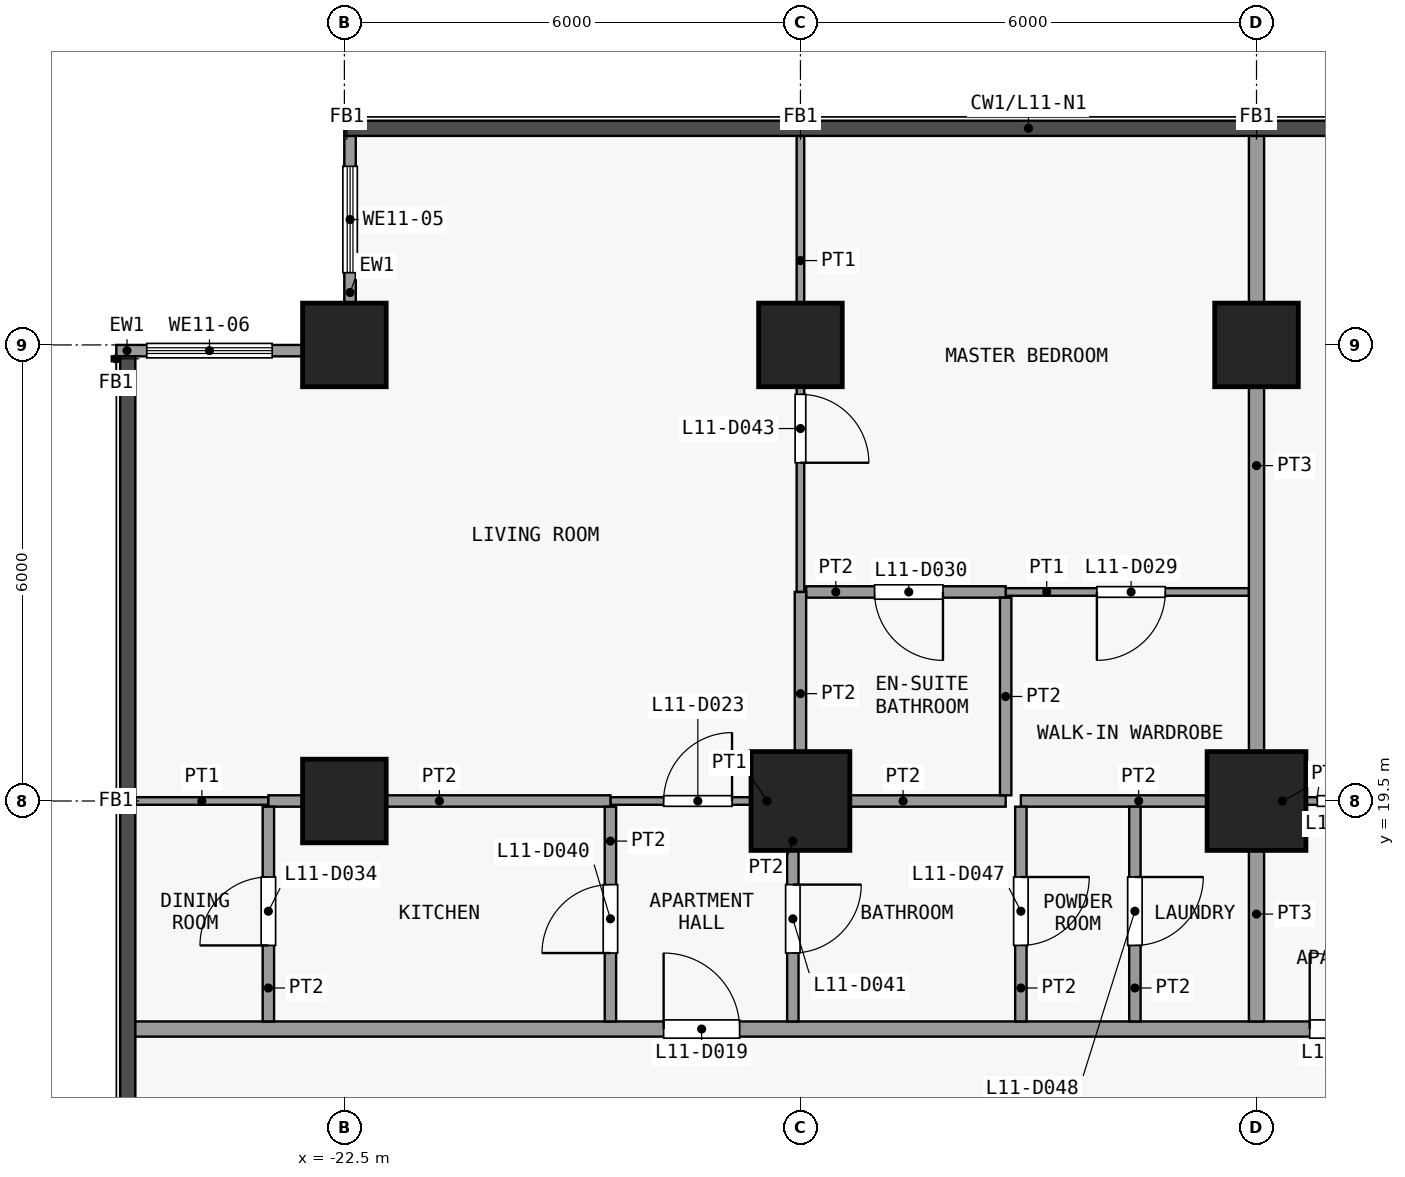
"""IFC4 building model, lengths in metres.
Left out: names, types, materials, properties, quantities, classifications, styles, units other than length and angle.
Written with IfcOpenShell. Run it as: python <this file> out.ifc"""

import sys

from ifc_helpers import new_model, si_unit, direction, frame, frame_2d, origin, origin_2d, place, context, subcontext, project, spatial, rectangle, extrude, element, fill, save


model = new_model("IFC4")
c1 = context("Model", 3, precision=1e-05, world=origin(), true_north=direction((0.0, 1.0)))
c2 = subcontext(c1, "Body", "Model", "MODEL_VIEW")
j1 = project(units=[si_unit("LENGTHUNIT", "METRE"), si_unit("PLANEANGLEUNIT", "RADIAN")], contexts=[c1])
p1 = place(None, origin())
s1 = spatial("IfcSite", under=j1, at=p1, CompositionType="ELEMENT")
p2 = place(p1, origin())
s2 = spatial("IfcBuilding", under=s1, at=p2, CompositionType="ELEMENT")
p3 = place(p2, frame((0.0, 0.0, 50.5)))
s3 = spatial("IfcBuildingStorey", under=s2, at=p3, CompositionType="ELEMENT", Elevation=50.5)
for number, where, z_axis, x_axis in (
    (1, (-22.5, 19.5, 0.0), (0.0, 0.0, 1.0), (1.0, 0.0, 0.0)),
    (2, (-22.5, 25.5, 0.0), (0.0, 0.0, 1.0), (1.0, 0.0, 0.0)),
):
    element("IfcColumn", number, at=place(p3, frame(where, z_axis=z_axis, x_axis=x_axis)), inside=s3, PredefinedType="COLUMN", context=c2, shape_type="SweptSolid", body=[
        extrude(rectangle(XDim=1.1, YDim=1.1, at=origin_2d()), origin(), (0.0, 0.0, 1.0), 3.6),
    ])
p4 = place(p3, frame((-16.5, 19.5, 0.0), z_axis=(0.0, 0.0, 1.0), x_axis=(1.0, 0.0, 0.0)))
e3 = element("IfcColumn", 3, at=p4, inside=s3, PredefinedType="COLUMN", context=c2, shape_type="SweptSolid", body=[
    extrude(rectangle(XDim=1.3, YDim=1.3, at=origin_2d()), origin(), (0.0, 0.0, 1.0), 3.6),
])
p5 = place(p3, frame((-16.5, 25.5, 0.0), z_axis=(0.0, 0.0, 1.0), x_axis=(1.0, 0.0, 0.0)))
e4 = element("IfcColumn", 4, at=p5, inside=s3, PredefinedType="COLUMN", context=c2, shape_type="SweptSolid", body=[
    extrude(rectangle(XDim=1.1, YDim=1.1, at=origin_2d()), origin(), (0.0, 0.0, 1.0), 3.6),
])
p6 = place(p3, frame((-10.5, 19.5, 0.0), z_axis=(0.0, 0.0, 1.0), x_axis=(1.0, 0.0, 0.0)))
e5 = element("IfcColumn", 5, at=p6, inside=s3, PredefinedType="COLUMN", context=c2, shape_type="SweptSolid", body=[
    extrude(rectangle(XDim=1.3, YDim=1.3, at=origin_2d()), origin(), (0.0, 0.0, 1.0), 3.6),
])
p7 = place(p3, frame((-10.5, 25.5, 0.0), z_axis=(0.0, 0.0, 1.0), x_axis=(1.0, 0.0, 0.0)))
e6 = element("IfcColumn", 6, at=p7, inside=s3, PredefinedType="COLUMN", context=c2, shape_type="SweptSolid", body=[
    extrude(rectangle(XDim=1.1, YDim=1.1, at=origin_2d()), origin(), (0.0, 0.0, 1.0), 3.6),
])
p8 = place(p3, frame((-22.425, 26.05, 0.0), z_axis=(0.0, 0.0, 1.0), x_axis=(0.0, 1.0, 0.0)))
e7 = element("IfcWall", 7, at=p8, inside=s3, PredefinedType="SOLIDWALL", context=c2, shape_type="SweptSolid", body=[
    extrude(rectangle(XDim=2.2, YDim=0.15, at=frame_2d((1.1, 0.0))), origin(), (0.0, 0.0, 1.0), 3.3),
])
p9 = place(p8, frame((0.4, 0.0, 0.9)))
e8 = element("IfcOpeningElement", 8, at=p9, cuts=e7, PredefinedType="OPENING", context=c2, shape_type="SweptSolid", body=[
    extrude(rectangle(XDim=1.4, YDim=2.4, at=frame_2d((0.7, 1.2))), frame((0.0, 0.085, 0.0), z_axis=(0.0, -1.0, 0.0), x_axis=(1.0, 0.0, 0.0)), (0.0, 0.0, 1.0), 0.17),
])
p10 = place(p3, frame((-25.5, 25.425, 0.0), z_axis=(0.0, 0.0, 1.0), x_axis=(1.0, 0.0, 0.0)))
e9 = element("IfcWall", 9, at=p10, inside=s3, PredefinedType="SOLIDWALL", context=c2, shape_type="SweptSolid", body=[
    extrude(rectangle(XDim=2.45, YDim=0.15, at=frame_2d((1.225, 0.0))), origin(), (0.0, 0.0, 1.0), 3.3),
])
p11 = place(p10, frame((0.4, 0.0, 0.9)))
e10 = element("IfcOpeningElement", 10, at=p11, cuts=e9, PredefinedType="OPENING", context=c2, shape_type="SweptSolid", body=[
    extrude(rectangle(XDim=1.65, YDim=2.4, at=frame_2d((0.825, 1.2))), frame((0.0, 0.085, 0.0), z_axis=(0.0, -1.0, 0.0), x_axis=(1.0, 0.0, 0.0)), (0.0, 0.0, 1.0), 0.17),
])
p12 = place(p3, frame((-25.35, 16.5, 0.0), z_axis=(0.0, 0.0, 1.0), x_axis=(1.0, 0.0, 0.0)))
e11 = element("IfcWall", 11, at=p12, inside=s3, PredefinedType="PARTITIONING", context=c2, shape_type="SweptSolid", body=[
    extrude(rectangle(XDim=50.7, YDim=0.2, at=frame_2d((25.35, 0.0))), origin(), (0.0, 0.0, 1.0), 3.3),
])
p13 = place(p12, frame((7.05, 0.0, 0.0)))
e12 = element("IfcOpeningElement", 12, at=p13, cuts=e11, PredefinedType="OPENING", context=c2, shape_type="SweptSolid", body=[
    extrude(rectangle(XDim=1.0, YDim=2.1, at=frame_2d((0.5, 1.05))), frame((0.0, 0.11, 0.0), z_axis=(0.0, -1.0, 0.0), x_axis=(1.0, 0.0, 0.0)), (0.0, 0.0, 1.0), 0.22),
])
p14 = place(p12, frame((15.55, 0.0, 0.0)))
e13 = element("IfcOpeningElement", 13, at=p14, cuts=e11, PredefinedType="OPENING", context=c2, shape_type="SweptSolid", body=[
    extrude(rectangle(XDim=1.0, YDim=2.1, at=frame_2d((0.5, 1.05))), frame((0.0, 0.11, 0.0), z_axis=(0.0, -1.0, 0.0), x_axis=(1.0, 0.0, 0.0)), (0.0, 0.0, 1.0), 0.22),
])
p15 = place(p12, frame((30.55, 0.0, 0.0)))
e14 = element("IfcOpeningElement", 14, at=p15, cuts=e11, PredefinedType="OPENING", context=c2, shape_type="SweptSolid", body=[
    extrude(rectangle(XDim=1.0, YDim=2.1, at=frame_2d((0.5, 1.05))), frame((0.0, 0.11, 0.0), z_axis=(0.0, -1.0, 0.0), x_axis=(1.0, 0.0, 0.0)), (0.0, 0.0, 1.0), 0.22),
])
p16 = place(p12, frame((45.05, 0.0, 0.0)))
e15 = element("IfcOpeningElement", 15, at=p16, cuts=e11, PredefinedType="OPENING", context=c2, shape_type="SweptSolid", body=[
    extrude(rectangle(XDim=1.0, YDim=2.1, at=frame_2d((0.5, 1.05))), frame((0.0, 0.11, 0.0), z_axis=(0.0, -1.0, 0.0), x_axis=(1.0, 0.0, 0.0)), (0.0, 0.0, 1.0), 0.22),
])
p17 = place(p3, frame((-25.25, 19.5, 0.0), z_axis=(0.0, 0.0, 1.0), x_axis=(1.0, 0.0, 0.0)))
e16 = element("IfcWall", 16, at=p17, inside=s3, PredefinedType="PARTITIONING", context=c2, shape_type="SweptSolid", body=[
    extrude(rectangle(XDim=1.75, YDim=0.1, at=frame_2d((0.875, 0.0))), origin(), (0.0, 0.0, 1.0), 3.3),
])
p18 = place(p3, frame((-19.0, 19.5, 0.0), z_axis=(0.0, 0.0, 1.0), x_axis=(1.0, 0.0, 0.0)))
e17 = element("IfcWall", 17, at=p18, inside=s3, PredefinedType="PARTITIONING", context=c2, shape_type="SweptSolid", body=[
    extrude(rectangle(XDim=2.4, YDim=0.1, at=frame_2d((1.2, 0.0))), origin(), (0.0, 0.0, 1.0), 3.3),
])
p19 = place(p18, frame((0.7, 0.0, 0.0)))
e18 = element("IfcOpeningElement", 18, at=p19, cuts=e17, PredefinedType="OPENING", context=c2, shape_type="SweptSolid", body=[
    extrude(rectangle(XDim=0.9, YDim=2.1, at=frame_2d((0.45, 1.05))), frame((0.0, 0.06, 0.0), z_axis=(0.0, -1.0, 0.0), x_axis=(1.0, 0.0, 0.0)), (0.0, 0.0, 1.0), 0.12),
])
p20 = place(p3, frame((-10.5, 19.5, 0.0), z_axis=(0.0, 0.0, 1.0), x_axis=(1.0, 0.0, 0.0)))
e19 = element("IfcWall", 19, at=p20, inside=s3, PredefinedType="PARTITIONING", context=c2, shape_type="SweptSolid", body=[
    extrude(rectangle(XDim=2.4, YDim=0.1, at=frame_2d((1.2, 0.0))), origin(), (0.0, 0.0, 1.0), 3.3),
])
p21 = place(p20, frame((0.8, 0.0, 0.0)))
e20 = element("IfcOpeningElement", 20, at=p21, cuts=e19, PredefinedType="OPENING", context=c2, shape_type="SweptSolid", body=[
    extrude(rectangle(XDim=0.9, YDim=2.1, at=frame_2d((0.45, 1.05))), frame((0.0, 0.06, 0.0), z_axis=(0.0, -1.0, 0.0), x_axis=(1.0, 0.0, 0.0)), (0.0, 0.0, 1.0), 0.12),
])
p22 = place(p3, frame((-23.5, 19.5, 0.0), z_axis=(0.0, 0.0, 1.0), x_axis=(1.0, 0.0, 0.0)))
e21 = element("IfcWall", 21, at=p22, inside=s3, PredefinedType="PARTITIONING", context=c2, shape_type="SweptSolid", body=[
    extrude(rectangle(XDim=4.5, YDim=0.15, at=frame_2d((2.25, 0.0))), origin(), (0.0, 0.0, 1.0), 3.3),
])
p23 = place(p3, frame((-16.5, 19.5, 0.0), z_axis=(0.0, 0.0, 1.0), x_axis=(1.0, 0.0, 0.0)))
e22 = element("IfcWall", 22, at=p23, inside=s3, PredefinedType="PARTITIONING", context=c2, shape_type="SweptSolid", body=[
    extrude(rectangle(XDim=2.7, YDim=0.15, at=frame_2d((1.35, 0.0))), origin(), (0.0, 0.0, 1.0), 3.3),
])
p24 = place(p3, frame((-13.6, 19.5, 0.0), z_axis=(0.0, 0.0, 1.0), x_axis=(1.0, 0.0, 0.0)))
e23 = element("IfcWall", 23, at=p24, inside=s3, PredefinedType="PARTITIONING", context=c2, shape_type="SweptSolid", body=[
    extrude(rectangle(XDim=3.1, YDim=0.15, at=frame_2d((1.55, 0.0))), origin(), (0.0, 0.0, 1.0), 3.3),
])
p25 = place(p3, frame((-13.8, 22.25, 0.0), z_axis=(0.0, 0.0, 1.0), x_axis=(1.0, 0.0, 0.0)))
e24 = element("IfcWall", 24, at=p25, inside=s3, PredefinedType="PARTITIONING", context=c2, shape_type="SweptSolid", body=[
    extrude(rectangle(XDim=3.2, YDim=0.1, at=frame_2d((1.6, 0.0))), origin(), (0.0, 0.0, 1.0), 3.3),
])
p26 = place(p25, frame((1.2, 0.0, 0.0)))
e25 = element("IfcOpeningElement", 25, at=p26, cuts=e24, PredefinedType="OPENING", context=c2, shape_type="SweptSolid", body=[
    extrude(rectangle(XDim=0.9, YDim=2.1, at=frame_2d((0.45, 1.05))), frame((0.0, 0.06, 0.0), z_axis=(0.0, -1.0, 0.0), x_axis=(1.0, 0.0, 0.0)), (0.0, 0.0, 1.0), 0.12),
])
p27 = place(p3, frame((-16.425, 22.25, 0.0), z_axis=(0.0, 0.0, 1.0), x_axis=(1.0, 0.0, 0.0)))
e26 = element("IfcWall", 26, at=p27, inside=s3, PredefinedType="PARTITIONING", context=c2, shape_type="SweptSolid", body=[
    extrude(rectangle(XDim=2.625, YDim=0.15, at=frame_2d((1.312, 0.0))), origin(), (0.0, 0.0, 1.0), 3.3),
])
p28 = place(p27, frame((0.9, 0.0, 0.0)))
e27 = element("IfcOpeningElement", 27, at=p28, cuts=e26, PredefinedType="OPENING", context=c2, shape_type="SweptSolid", body=[
    extrude(rectangle(XDim=0.9, YDim=2.1, at=frame_2d((0.45, 1.05))), frame((0.0, 0.085, 0.0), z_axis=(0.0, -1.0, 0.0), x_axis=(1.0, 0.0, 0.0)), (0.0, 0.0, 1.0), 0.17),
])
p29 = place(p3, frame((-23.5, 16.6, 0.0), z_axis=(0.0, 0.0, 1.0), x_axis=(0.0, 1.0, 0.0)))
e28 = element("IfcWall", 28, at=p29, inside=s3, PredefinedType="PARTITIONING", context=c2, shape_type="SweptSolid", body=[
    extrude(rectangle(XDim=2.825, YDim=0.15, at=frame_2d((1.413, 0.0))), origin(), (0.0, 0.0, 1.0), 3.3),
])
p30 = place(p29, frame((1.0, 0.0, 0.0)))
e29 = element("IfcOpeningElement", 29, at=p30, cuts=e28, PredefinedType="OPENING", context=c2, shape_type="SweptSolid", body=[
    extrude(rectangle(XDim=0.9, YDim=2.1, at=frame_2d((0.45, 1.05))), frame((0.0, 0.085, 0.0), z_axis=(0.0, -1.0, 0.0), x_axis=(1.0, 0.0, 0.0)), (0.0, 0.0, 1.0), 0.17),
])
p31 = place(p3, frame((-19.0, 16.6, 0.0), z_axis=(0.0, 0.0, 1.0), x_axis=(0.0, 1.0, 0.0)))
e30 = element("IfcWall", 30, at=p31, inside=s3, PredefinedType="PARTITIONING", context=c2, shape_type="SweptSolid", body=[
    extrude(rectangle(XDim=2.825, YDim=0.15, at=frame_2d((1.413, 0.0))), origin(), (0.0, 0.0, 1.0), 3.3),
])
p32 = place(p31, frame((0.9, 0.0, 0.0)))
e31 = element("IfcOpeningElement", 31, at=p32, cuts=e30, PredefinedType="OPENING", context=c2, shape_type="SweptSolid", body=[
    extrude(rectangle(XDim=0.9, YDim=2.1, at=frame_2d((0.45, 1.05))), frame((0.0, 0.085, 0.0), z_axis=(0.0, -1.0, 0.0), x_axis=(1.0, 0.0, 0.0)), (0.0, 0.0, 1.0), 0.17),
])
p33 = place(p3, frame((-16.6, 16.6, 0.0), z_axis=(0.0, 0.0, 1.0), x_axis=(0.0, 1.0, 0.0)))
e32 = element("IfcWall", 32, at=p33, inside=s3, PredefinedType="PARTITIONING", context=c2, shape_type="SweptSolid", body=[
    extrude(rectangle(XDim=2.825, YDim=0.15, at=frame_2d((1.413, 0.0))), origin(), (0.0, 0.0, 1.0), 3.3),
])
p34 = place(p33, frame((0.9, 0.0, 0.0)))
e33 = element("IfcOpeningElement", 33, at=p34, cuts=e32, PredefinedType="OPENING", context=c2, shape_type="SweptSolid", body=[
    extrude(rectangle(XDim=0.9, YDim=2.1, at=frame_2d((0.45, 1.05))), frame((0.0, 0.085, 0.0), z_axis=(0.0, -1.0, 0.0), x_axis=(1.0, 0.0, 0.0)), (0.0, 0.0, 1.0), 0.17),
])
p35 = place(p3, frame((-16.5, 22.25, 0.0), z_axis=(0.0, 0.0, 1.0), x_axis=(0.0, 1.0, 0.0)))
e34 = element("IfcWall", 34, at=p35, inside=s3, PredefinedType="PARTITIONING", context=c2, shape_type="SweptSolid", body=[
    extrude(rectangle(XDim=6.0, YDim=0.1, at=frame_2d((3.0, 0.0))), origin(), (0.0, 0.0, 1.0), 3.3),
])
p36 = place(p35, frame((1.7, 0.0, 0.0)))
e35 = element("IfcOpeningElement", 35, at=p36, cuts=e34, PredefinedType="OPENING", context=c2, shape_type="SweptSolid", body=[
    extrude(rectangle(XDim=0.9, YDim=2.1, at=frame_2d((0.45, 1.05))), frame((0.0, 0.06, 0.0), z_axis=(0.0, -1.0, 0.0), x_axis=(1.0, 0.0, 0.0)), (0.0, 0.0, 1.0), 0.12),
])
p37 = place(p3, frame((-16.5, 19.575, 0.0), z_axis=(0.0, 0.0, 1.0), x_axis=(0.0, 1.0, 0.0)))
e36 = element("IfcWall", 36, at=p37, inside=s3, PredefinedType="PARTITIONING", context=c2, shape_type="SweptSolid", body=[
    extrude(rectangle(XDim=2.675, YDim=0.15, at=frame_2d((1.337, 0.0))), origin(), (0.0, 0.0, 1.0), 3.3),
])
p38 = place(p3, frame((-13.8, 19.575, 0.0), z_axis=(0.0, 0.0, 1.0), x_axis=(0.0, 1.0, 0.0)))
e37 = element("IfcWall", 37, at=p38, inside=s3, PredefinedType="PARTITIONING", context=c2, shape_type="SweptSolid", body=[
    extrude(rectangle(XDim=2.6, YDim=0.15, at=frame_2d((1.3, 0.0))), origin(), (0.0, 0.0, 1.0), 3.3),
])
p39 = place(p3, frame((-13.6, 16.6, 0.0), z_axis=(0.0, 0.0, 1.0), x_axis=(0.0, 1.0, 0.0)))
e38 = element("IfcWall", 38, at=p39, inside=s3, PredefinedType="PARTITIONING", context=c2, shape_type="SweptSolid", body=[
    extrude(rectangle(XDim=2.825, YDim=0.15, at=frame_2d((1.413, 0.0))), origin(), (0.0, 0.0, 1.0), 3.3),
])
p40 = place(p39, frame((1.0, 0.0, 0.0)))
e39 = element("IfcOpeningElement", 39, at=p40, cuts=e38, PredefinedType="OPENING", context=c2, shape_type="SweptSolid", body=[
    extrude(rectangle(XDim=0.9, YDim=2.1, at=frame_2d((0.45, 1.05))), frame((0.0, 0.085, 0.0), z_axis=(0.0, -1.0, 0.0), x_axis=(1.0, 0.0, 0.0)), (0.0, 0.0, 1.0), 0.17),
])
p41 = place(p3, frame((-12.1, 16.6, 0.0), z_axis=(0.0, 0.0, 1.0), x_axis=(0.0, 1.0, 0.0)))
e40 = element("IfcWall", 40, at=p41, inside=s3, PredefinedType="PARTITIONING", context=c2, shape_type="SweptSolid", body=[
    extrude(rectangle(XDim=2.825, YDim=0.15, at=frame_2d((1.413, 0.0))), origin(), (0.0, 0.0, 1.0), 3.3),
])
p42 = place(p41, frame((1.0, 0.0, 0.0)))
e41 = element("IfcOpeningElement", 41, at=p42, cuts=e40, PredefinedType="OPENING", context=c2, shape_type="SweptSolid", body=[
    extrude(rectangle(XDim=0.9, YDim=2.1, at=frame_2d((0.45, 1.05))), frame((0.0, 0.085, 0.0), z_axis=(0.0, -1.0, 0.0), x_axis=(1.0, 0.0, 0.0)), (0.0, 0.0, 1.0), 0.17),
])
p43 = place(p3, frame((-10.5, 16.6, 0.0), z_axis=(0.0, 0.0, 1.0), x_axis=(0.0, 1.0, 0.0)))
e42 = element("IfcWall", 42, at=p43, inside=s3, PredefinedType="PARTITIONING", context=c2, shape_type="SweptSolid", body=[
    extrude(rectangle(XDim=2.825, YDim=0.2, at=frame_2d((1.413, 0.0))), origin(), (0.0, 0.0, 1.0), 3.3),
])
p44 = place(p3, frame((-10.5, 19.575, 0.0), z_axis=(0.0, 0.0, 1.0), x_axis=(0.0, 1.0, 0.0)))
e43 = element("IfcWall", 43, at=p44, inside=s3, PredefinedType="PARTITIONING", context=c2, shape_type="SweptSolid", body=[
    extrude(rectangle(XDim=8.675, YDim=0.2, at=frame_2d((4.337, 0.0))), origin(), (0.0, 0.0, 1.0), 3.3),
])
p45 = place(p9, origin())
e44 = element("IfcWindow", 44, at=p45, inside=s3, PartitioningType="SINGLE_PANEL", PredefinedType="WINDOW", context=c2, shape_type="SweptSolid", body=[
    extrude(rectangle(XDim=1.4, YDim=2.4, at=frame_2d((0.7, 1.2))), frame((0.0, 0.03, 0.0), z_axis=(0.0, -1.0, 0.0), x_axis=(1.0, 0.0, 0.0)), (0.0, 0.0, 1.0), 0.06),
])
fill(e8, e44)
p46 = place(p11, origin())
e45 = element("IfcWindow", 45, at=p46, inside=s3, PartitioningType="SINGLE_PANEL", PredefinedType="WINDOW", context=c2, shape_type="SweptSolid", body=[
    extrude(rectangle(XDim=1.65, YDim=2.4, at=frame_2d((0.825, 1.2))), frame((0.0, 0.03, 0.0), z_axis=(0.0, -1.0, 0.0), x_axis=(1.0, 0.0, 0.0)), (0.0, 0.0, 1.0), 0.06),
])
fill(e10, e45)
p47 = place(p13, origin())
e46 = element("IfcDoor", 46, at=p47, inside=s3, OperationType="SINGLE_SWING_RIGHT", PredefinedType="DOOR", context=c2, shape_type="SweptSolid", body=[
    extrude(rectangle(XDim=1.0, YDim=2.1, at=frame_2d((0.5, 1.05))), frame((0.0, 0.025, 0.0), z_axis=(0.0, -1.0, 0.0), x_axis=(1.0, 0.0, 0.0)), (0.0, 0.0, 1.0), 0.05),
])
fill(e12, e46)
p48 = place(p14, origin())
e47 = element("IfcDoor", 47, at=p48, inside=s3, OperationType="SINGLE_SWING_RIGHT", PredefinedType="DOOR", context=c2, shape_type="SweptSolid", body=[
    extrude(rectangle(XDim=1.0, YDim=2.1, at=frame_2d((0.5, 1.05))), frame((0.0, 0.025, 0.0), z_axis=(0.0, -1.0, 0.0), x_axis=(1.0, 0.0, 0.0)), (0.0, 0.0, 1.0), 0.05),
])
fill(e13, e47)
p49 = place(p19, origin())
e48 = element("IfcDoor", 48, at=p49, inside=s3, OperationType="SINGLE_SWING_LEFT", PredefinedType="DOOR", context=c2, shape_type="SweptSolid", body=[
    extrude(rectangle(XDim=0.9, YDim=2.1, at=frame_2d((0.45, 1.05))), frame((0.0, 0.025, 0.0), z_axis=(0.0, -1.0, 0.0), x_axis=(1.0, 0.0, 0.0)), (0.0, 0.0, 1.0), 0.05),
])
fill(e18, e48)
p50 = place(p21, origin())
e49 = element("IfcDoor", 49, at=p50, inside=s3, OperationType="SINGLE_SWING_LEFT", PredefinedType="DOOR", context=c2, shape_type="SweptSolid", body=[
    extrude(rectangle(XDim=0.9, YDim=2.1, at=frame_2d((0.45, 1.05))), frame((0.0, 0.025, 0.0), z_axis=(0.0, -1.0, 0.0), x_axis=(1.0, 0.0, 0.0)), (0.0, 0.0, 1.0), 0.05),
])
fill(e20, e49)
p51 = place(p26, origin())
e50 = element("IfcDoor", 50, at=p51, inside=s3, OperationType="SINGLE_SWING_LEFT", PredefinedType="DOOR", context=c2, shape_type="SweptSolid", body=[
    extrude(rectangle(XDim=0.9, YDim=2.1, at=frame_2d((0.45, 1.05))), frame((0.0, 0.025, 0.0), z_axis=(0.0, -1.0, 0.0), x_axis=(1.0, 0.0, 0.0)), (0.0, 0.0, 1.0), 0.05),
])
fill(e25, e50)
p52 = place(p28, origin())
e51 = element("IfcDoor", 51, at=p52, inside=s3, OperationType="SINGLE_SWING_RIGHT", PredefinedType="DOOR", context=c2, shape_type="SweptSolid", body=[
    extrude(rectangle(XDim=0.9, YDim=2.1, at=frame_2d((0.45, 1.05))), frame((0.0, 0.025, 0.0), z_axis=(0.0, -1.0, 0.0), x_axis=(1.0, 0.0, 0.0)), (0.0, 0.0, 1.0), 0.05),
])
fill(e27, e51)
p53 = place(p30, origin())
e52 = element("IfcDoor", 52, at=p53, inside=s3, OperationType="SINGLE_SWING_RIGHT", PredefinedType="DOOR", context=c2, shape_type="SweptSolid", body=[
    extrude(rectangle(XDim=0.9, YDim=2.1, at=frame_2d((0.45, 1.05))), frame((0.0, 0.025, 0.0), z_axis=(0.0, -1.0, 0.0), x_axis=(1.0, 0.0, 0.0)), (0.0, 0.0, 1.0), 0.05),
])
fill(e29, e52)
p54 = place(p32, origin())
e53 = element("IfcDoor", 53, at=p54, inside=s3, OperationType="SINGLE_SWING_RIGHT", PredefinedType="DOOR", context=c2, shape_type="SweptSolid", body=[
    extrude(rectangle(XDim=0.9, YDim=2.1, at=frame_2d((0.45, 1.05))), frame((0.0, 0.025, 0.0), z_axis=(0.0, -1.0, 0.0), x_axis=(1.0, 0.0, 0.0)), (0.0, 0.0, 1.0), 0.05),
])
fill(e31, e53)
p55 = place(p34, origin())
e54 = element("IfcDoor", 54, at=p55, inside=s3, OperationType="SINGLE_SWING_RIGHT", PredefinedType="DOOR", context=c2, shape_type="SweptSolid", body=[
    extrude(rectangle(XDim=0.9, YDim=2.1, at=frame_2d((0.45, 1.05))), frame((0.0, 0.025, 0.0), z_axis=(0.0, -1.0, 0.0), x_axis=(1.0, 0.0, 0.0)), (0.0, 0.0, 1.0), 0.05),
])
fill(e33, e54)
p56 = place(p36, origin())
e55 = element("IfcDoor", 55, at=p56, inside=s3, OperationType="SINGLE_SWING_LEFT", PredefinedType="DOOR", context=c2, shape_type="SweptSolid", body=[
    extrude(rectangle(XDim=0.9, YDim=2.1, at=frame_2d((0.45, 1.05))), frame((0.0, 0.025, 0.0), z_axis=(0.0, -1.0, 0.0), x_axis=(1.0, 0.0, 0.0)), (0.0, 0.0, 1.0), 0.05),
])
fill(e35, e55)
p57 = place(p40, origin())
e56 = element("IfcDoor", 56, at=p57, inside=s3, OperationType="SINGLE_SWING_RIGHT", PredefinedType="DOOR", context=c2, shape_type="SweptSolid", body=[
    extrude(rectangle(XDim=0.9, YDim=2.1, at=frame_2d((0.45, 1.05))), frame((0.0, 0.025, 0.0), z_axis=(0.0, -1.0, 0.0), x_axis=(1.0, 0.0, 0.0)), (0.0, 0.0, 1.0), 0.05),
])
fill(e39, e56)
p58 = place(p42, origin())
e57 = element("IfcDoor", 57, at=p58, inside=s3, OperationType="SINGLE_SWING_RIGHT", PredefinedType="DOOR", context=c2, shape_type="SweptSolid", body=[
    extrude(rectangle(XDim=0.9, YDim=2.1, at=frame_2d((0.45, 1.05))), frame((0.0, 0.025, 0.0), z_axis=(0.0, -1.0, 0.0), x_axis=(1.0, 0.0, 0.0)), (0.0, 0.0, 1.0), 0.05),
])
fill(e41, e57)
save(model, sys.argv[1])
